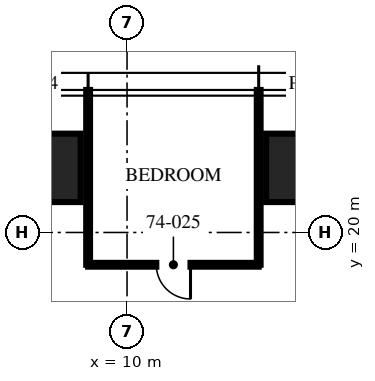
"""IFC4 building model, lengths in metres.
Left out: names, types, materials, properties, quantities, classifications, styles, units other than length and angle.
Written with IfcOpenShell. Run it as: python <this file> out.ifc"""

import sys

from ifc_helpers import new_model, si_unit, direction, frame, frame_2d, origin, origin_2d, place, context, subcontext, project, spatial, rectangle, extrude, element, fill, save


model = new_model("IFC4")
c1 = context("Model", 3, precision=1e-05, world=origin(), true_north=direction((0.0, 1.0)))
c2 = subcontext(c1, "Body", "Model", "MODEL_VIEW")
j1 = project(units=[si_unit("LENGTHUNIT", "METRE"), si_unit("PLANEANGLEUNIT", "RADIAN")], contexts=[c1])
p1 = place(None, origin())
s1 = spatial("IfcSite", under=j1, at=p1, CompositionType="ELEMENT")
p2 = place(p1, origin())
s2 = spatial("IfcBuilding", under=s1, at=p2, CompositionType="ELEMENT")
p3 = place(p2, frame((0.0, 0.0, 297.0)))
s3 = spatial("IfcBuildingStorey", under=s2, at=p3, CompositionType="ELEMENT", Elevation=297.0)
for number, where, z_axis, x_axis in (
    (1, (7.48, 21.7, 0.0), (0.0, 0.0, 1.0), (1.0, 0.0, 0.0)),
    (2, (14.96, 21.7, 0.0), (0.0, 0.0, 1.0), (1.0, 0.0, 0.0)),
):
    element("IfcColumn", number, at=place(p3, frame(where, z_axis=z_axis, x_axis=x_axis)), inside=s3, PredefinedType="COLUMN", context=c2, shape_type="SweptSolid", body=[
        extrude(rectangle(XDim=2.6, YDim=1.8, at=origin_2d()), origin(), (0.0, 0.0, 1.0), 3.75),
    ])
for number, where, z_axis, x_axis in (
    (3, (13.464, 19.15, 0.0), (0.0, 0.0, 1.0), (0.0, 1.0, 0.0)),
    (4, (8.976, 19.15, 0.0), (0.0, 0.0, 1.0), (0.0, 1.0, 0.0)),
):
    element("IfcWall", number, at=place(p3, frame(where, z_axis=z_axis, x_axis=x_axis)), inside=s3, PredefinedType="PARTITIONING", context=c2, shape_type="SweptSolid", body=[
        extrude(rectangle(XDim=4.6, YDim=0.1, at=frame_2d((2.3, 0.0))), origin(), (0.0, 0.0, 1.0), 3.01),
    ])
p4 = place(p3, frame((13.464, 19.15, 0.0), z_axis=(0.0, 0.0, 1.0), x_axis=(-1.0, 0.0, 0.0)))
e5 = element("IfcWall", 5, at=p4, inside=s3, PredefinedType="PARTITIONING", context=c2, shape_type="SweptSolid", body=[
    extrude(rectangle(XDim=4.488, YDim=0.1, at=frame_2d((2.244, 0.0))), origin(), (0.0, 0.0, 1.0), 2.91),
])
p5 = place(p4, frame((1.794, 0.0, 0.0)))
e6 = element("IfcOpeningElement", 6, at=p5, cuts=e5, PredefinedType="OPENING", context=c2, shape_type="SweptSolid", body=[
    extrude(rectangle(XDim=0.9, YDim=2.1, at=frame_2d((0.45, 1.05))), frame((0.0, 0.06, 0.0), z_axis=(0.0, -1.0, 0.0), x_axis=(1.0, 0.0, 0.0)), (0.0, 0.0, 1.0), 0.12),
])
p6 = place(p5, origin())
e7 = element("IfcDoor", 7, at=p6, inside=s3, OperationType="SINGLE_SWING_LEFT", PredefinedType="DOOR", context=c2, shape_type="SweptSolid", body=[
    extrude(rectangle(XDim=0.9, YDim=2.1, at=frame_2d((0.45, 1.05))), frame((0.0, 0.025, 0.0), z_axis=(0.0, -1.0, 0.0), x_axis=(1.0, 0.0, 0.0)), (0.0, 0.0, 1.0), 0.05),
])
fill(e6, e7)
save(model, sys.argv[1])
